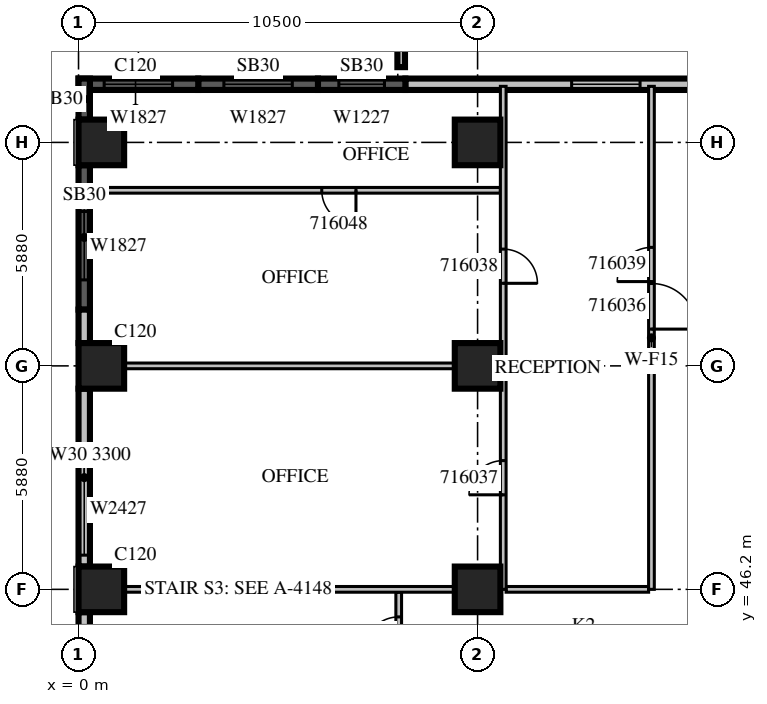
"""IFC4 building model, lengths in metres.
Left out: names, types, materials, properties, quantities, classifications, styles, units other than length and angle.
Written with IfcOpenShell. Run it as: python <this file> out.ifc"""

import sys

from ifc_helpers import new_model, si_unit, direction, frame, frame_2d, origin, origin_2d, place, context, subcontext, project, spatial, rectangle, extrude, source, transform, mapped, element, fill, save


model = new_model("IFC4")
c1 = context("Model", 3, precision=1e-05, world=origin(), true_north=direction((0.0, 1.0)))
c2 = subcontext(c1, "Body", "Model", "MODEL_VIEW")
j1 = project(units=[si_unit("LENGTHUNIT", "METRE"), si_unit("PLANEANGLEUNIT", "RADIAN")], contexts=[c1])
p1 = place(None, origin())
s1 = spatial("IfcSite", under=j1, at=p1, CompositionType="ELEMENT")
p2 = place(p1, origin())
s2 = spatial("IfcBuilding", under=s1, at=p2, CompositionType="ELEMENT")
p3 = place(p2, frame((0.0, 0.0, 78.3)))
s3 = spatial("IfcBuildingStorey", under=s2, at=p3, CompositionType="ELEMENT", Elevation=78.3)
m1 = source(origin(), c2, "Body", "SweptSolid", [
    extrude(rectangle(XDim=1.2, YDim=1.2, at=origin_2d()), origin(), (0.0, 0.0, 1.0), 4.2),
])
for number, where, z_axis, x_axis in (
    (1, (0.6, 46.2, 0.0), (0.0, 0.0, 1.0), (1.0, 0.0, 0.0)),
    (2, (10.5, 46.2, 0.0), (0.0, 0.0, 1.0), (1.0, 0.0, 0.0)),
    (3, (0.6, 52.08, 0.0), (0.0, 0.0, 1.0), (1.0, 0.0, 0.0)),
    (4, (10.5, 52.08, 0.0), (0.0, 0.0, 1.0), (1.0, 0.0, 0.0)),
    (5, (0.6, 57.96, 0.0), (0.0, 0.0, 1.0), (1.0, 0.0, 0.0)),
    (6, (10.5, 57.96, 0.0), (0.0, 0.0, 1.0), (1.0, 0.0, 0.0)),
):
    element("IfcColumn", number, at=place(p3, frame(where, z_axis=z_axis, x_axis=x_axis)), inside=s3, PredefinedType="COLUMN", context=c2, shape_type="MappedRepresentation", body=[
        mapped(m1, transform((0.0, 0.0, 0.0), scale=1.0)),
    ])
p4 = place(p3, frame((16.8, 59.49, 0.0), z_axis=(0.0, 0.0, 1.0), x_axis=(-1.0, 0.0, 0.0)))
e7 = element("IfcWall", 7, at=p4, inside=s3, PredefinedType="STANDARD", context=c2, shape_type="SweptSolid", body=[
    extrude(rectangle(XDim=8.2, YDim=0.3, at=frame_2d((4.1, 0.0))), origin(), (0.0, 0.0, 1.0), 3.8),
])
m2 = source(origin(), c2, "Body", "SweptSolid", [
    extrude(rectangle(XDim=1.8, YDim=2.4, at=frame_2d((0.9, 1.2))), frame((0.0, 0.16, 0.0), z_axis=(0.0, -1.0, 0.0), x_axis=(1.0, 0.0, 0.0)), (0.0, 0.0, 1.0), 0.32),
])
p5 = place(p4, frame((2.025, 0.0, 0.0)))
e8 = element("IfcOpeningElement", 8, at=p5, cuts=e7, PredefinedType="OPENING", context=c2, shape_type="MappedRepresentation", body=[
    mapped(m2, transform((0.0, 0.0, 0.0), scale=1.0)),
])
p6 = place(p3, frame((8.6, 59.49, 0.0), z_axis=(0.0, 0.0, 1.0), x_axis=(-1.0, 0.0, 0.0)))
e9 = element("IfcWall", 9, at=p6, inside=s3, PredefinedType="SOLIDWALL", context=c2, shape_type="SweptSolid", body=[
    extrude(rectangle(XDim=2.3, YDim=0.3, at=frame_2d((1.15, 0.0))), origin(), (0.0, 0.0, 1.0), 3.8),
])
m3 = source(origin(), c2, "Body", "SweptSolid", [
    extrude(rectangle(XDim=1.2, YDim=2.7, at=frame_2d((0.6, 1.35))), frame((0.0, 0.16, 0.0), z_axis=(0.0, -1.0, 0.0), x_axis=(1.0, 0.0, 0.0)), (0.0, 0.0, 1.0), 0.32),
])
p7 = place(p6, frame((0.55, 0.0, 0.6)))
e10 = element("IfcOpeningElement", 10, at=p7, cuts=e9, PredefinedType="OPENING", context=c2, shape_type="MappedRepresentation", body=[
    mapped(m3, transform((0.0, 0.0, 0.0), scale=1.0)),
])
p8 = place(p3, frame((6.3, 59.49, 0.0), z_axis=(0.0, 0.0, 1.0), x_axis=(-1.0, 0.0, 0.0)))
e11 = element("IfcWall", 11, at=p8, inside=s3, PredefinedType="SOLIDWALL", context=c2, shape_type="SweptSolid", body=[
    extrude(rectangle(XDim=3.15, YDim=0.3, at=frame_2d((1.575, 0.0))), origin(), (0.0, 0.0, 1.0), 3.8),
])
m4 = source(origin(), c2, "Body", "SweptSolid", [
    extrude(rectangle(XDim=1.8, YDim=2.7, at=frame_2d((0.9, 1.35))), frame((0.0, 0.16, 0.0), z_axis=(0.0, -1.0, 0.0), x_axis=(1.0, 0.0, 0.0)), (0.0, 0.0, 1.0), 0.32),
])
p9 = place(p8, frame((0.675, 0.0, 0.6)))
e12 = element("IfcOpeningElement", 12, at=p9, cuts=e11, PredefinedType="OPENING", context=c2, shape_type="MappedRepresentation", body=[
    mapped(m4, transform((0.0, 0.0, 0.0), scale=1.0)),
])
m5 = source(origin(), c2, "Body", "SweptSolid", [
    extrude(rectangle(XDim=3.15, YDim=0.3, at=frame_2d((1.575, 0.0))), origin(), (0.0, 0.0, 1.0), 3.8),
])
p10 = place(p3, frame((3.15, 59.49, 0.0), z_axis=(0.0, 0.0, 1.0), x_axis=(-1.0, 0.0, 0.0)))
e13 = element("IfcWall", 13, at=p10, inside=s3, PredefinedType="SOLIDWALL", context=c2, shape_type="MappedRepresentation", body=[
    mapped(m5, transform((0.0, 0.0, 0.0), scale=1.0)),
])
p11 = place(p10, frame((0.675, 0.0, 0.6)))
e14 = element("IfcOpeningElement", 14, at=p11, cuts=e13, PredefinedType="OPENING", context=c2, shape_type="MappedRepresentation", body=[
    mapped(m4, transform((0.0, 0.0, 0.0), scale=1.0)),
])
p12 = place(p3, frame((0.15, 59.64, 0.0), z_axis=(0.0, 0.0, 1.0), x_axis=(0.0, -1.0, 0.0)))
e15 = element("IfcWall", 15, at=p12, inside=s3, PredefinedType="SOLIDWALL", context=c2, shape_type="SweptSolid", body=[
    extrude(rectangle(XDim=1.08, YDim=0.3, at=frame_2d((0.54, 0.0))), origin(), (0.0, 0.0, 1.0), 3.8),
])
m6 = source(origin(), c2, "Body", "SweptSolid", [
    extrude(rectangle(XDim=3.8, YDim=0.3, at=frame_2d((1.9, 0.0))), origin(), (0.0, 0.0, 1.0), 3.8),
])
p13 = place(p3, frame((0.15, 57.36, 0.0), z_axis=(0.0, 0.0, 1.0), x_axis=(0.0, -1.0, 0.0)))
e16 = element("IfcWall", 16, at=p13, inside=s3, PredefinedType="SOLIDWALL", context=c2, shape_type="MappedRepresentation", body=[
    mapped(m6, transform((0.0, 0.0, 0.0), scale=1.0)),
])
p14 = place(p13, frame((1.218, 0.0, 0.6)))
e17 = element("IfcOpeningElement", 17, at=p14, cuts=e16, PredefinedType="OPENING", context=c2, shape_type="MappedRepresentation", body=[
    mapped(m4, transform((0.0, 0.0, 0.0), scale=1.0)),
])
m7 = source(origin(), c2, "Body", "SweptSolid", [
    extrude(rectangle(XDim=0.88, YDim=0.3, at=frame_2d((0.44, 0.0))), origin(), (0.0, 0.0, 1.0), 3.8),
])
p15 = place(p3, frame((0.15, 53.56, 0.0), z_axis=(0.0, 0.0, 1.0), x_axis=(0.0, -1.0, 0.0)))
e18 = element("IfcWall", 18, at=p15, inside=s3, PredefinedType="STANDARD", context=c2, shape_type="MappedRepresentation", body=[
    mapped(m7, transform((0.0, 0.0, 0.0), scale=1.0)),
])
m8 = source(origin(), c2, "Body", "SweptSolid", [
    extrude(rectangle(XDim=4.68, YDim=0.3, at=frame_2d((2.34, 0.0))), origin(), (0.0, 0.0, 1.0), 3.3),
])
p16 = place(p3, frame((0.15, 51.48, 0.0), z_axis=(0.0, 0.0, 1.0), x_axis=(0.0, -1.0, 0.0)))
e19 = element("IfcWall", 19, at=p16, inside=s3, PredefinedType="STANDARD", context=c2, shape_type="MappedRepresentation", body=[
    mapped(m8, transform((0.0, 0.0, 0.0), scale=1.0)),
])
m9 = source(origin(), c2, "Body", "SweptSolid", [
    extrude(rectangle(XDim=2.4, YDim=2.7, at=frame_2d((1.2, 1.35))), frame((0.0, 0.16, 0.0), z_axis=(0.0, -1.0, 0.0), x_axis=(1.0, 0.0, 0.0)), (0.0, 0.0, 1.0), 0.32),
])
p17 = place(p16, frame((1.98, 0.0, 0.6)))
e20 = element("IfcOpeningElement", 20, at=p17, cuts=e19, PredefinedType="OPENING", context=c2, shape_type="MappedRepresentation", body=[
    mapped(m9, transform((0.0, 0.0, 0.0), scale=1.0)),
])
m10 = source(origin(), c2, "Body", "SweptSolid", [
    extrude(rectangle(XDim=1.6, YDim=0.3, at=frame_2d((0.8, 0.0))), origin(), (0.0, 0.0, 1.0), 3.8),
])
p18 = place(p3, frame((0.15, 45.6, 0.0), z_axis=(0.0, 0.0, 1.0), x_axis=(0.0, -1.0, 0.0)))
e21 = element("IfcWall", 21, at=p18, inside=s3, PredefinedType="STANDARD", context=c2, shape_type="MappedRepresentation", body=[
    mapped(m10, transform((0.0, 0.0, 0.0), scale=1.0)),
])
m11 = source(origin(), c2, "Body", "SweptSolid", [
    extrude(rectangle(XDim=0.9, YDim=2.7, at=frame_2d((0.45, 1.35))), frame((0.0, 0.16, 0.0), z_axis=(0.0, -1.0, 0.0), x_axis=(1.0, 0.0, 0.0)), (0.0, 0.0, 1.0), 0.32),
])
p19 = place(p18, frame((0.35, 0.0, 0.6)))
e22 = element("IfcOpeningElement", 22, at=p19, cuts=e21, PredefinedType="OPENING", context=c2, shape_type="MappedRepresentation", body=[
    mapped(m11, transform((0.0, 0.0, 0.0), scale=1.0)),
])
p20 = place(p3, frame((8.49, 59.94, 0.0), z_axis=(0.0, 0.0, 1.0), x_axis=(0.0, 1.0, 0.0)))
e23 = element("IfcWall", 23, at=p20, inside=s3, PredefinedType="PARAPET", context=c2, shape_type="SweptSolid", body=[
    extrude(rectangle(XDim=5.49, YDim=0.2, at=frame_2d((2.745, 0.0))), origin(), (0.0, 0.0, 1.0), 1.1),
])
m12 = source(origin(), c2, "Body", "SweptSolid", [
    extrude(rectangle(XDim=2.2, YDim=0.15, at=frame_2d((1.1, 0.0))), origin(), (0.0, 0.0, 1.0), 3.8),
])
p21 = place(p3, frame((8.425, 43.925, 0.0), z_axis=(0.0, 0.0, 1.0), x_axis=(0.0, 1.0, 0.0)))
e24 = element("IfcWall", 24, at=p21, inside=s3, PredefinedType="PARTITIONING", context=c2, shape_type="MappedRepresentation", body=[
    mapped(m12, transform((0.0, 0.0, 0.0), scale=1.0)),
])
m13 = source(origin(), c2, "Body", "SweptSolid", [
    extrude(rectangle(XDim=0.9, YDim=2.1, at=frame_2d((0.45, 1.05))), frame((0.0, 0.085, 0.0), z_axis=(0.0, -1.0, 0.0), x_axis=(1.0, 0.0, 0.0)), (0.0, 0.0, 1.0), 0.17),
])
p22 = place(p21, frame((0.65, 0.0, 0.0)))
e25 = element("IfcOpeningElement", 25, at=p22, cuts=e24, PredefinedType="OPENING", context=c2, shape_type="MappedRepresentation", body=[
    mapped(m13, transform((0.0, 0.0, 0.0), scale=1.0)),
])
m14 = source(origin(), c2, "Body", "SweptSolid", [
    extrude(rectangle(XDim=8.702, YDim=0.15, at=frame_2d((4.351, 0.0))), origin(), (0.0, 0.0, 1.0), 3.8),
])
p23 = place(p3, frame((9.901, 52.08, 0.0), z_axis=(0.0, 0.0, 1.0), x_axis=(-1.0, 0.0, 0.0)))
e26 = element("IfcWall", 26, at=p23, inside=s3, PredefinedType="PARTITIONING", context=c2, shape_type="MappedRepresentation", body=[
    mapped(m14, transform((0.0, 0.0, 0.0), scale=1.0)),
])
m15 = source(origin(), c2, "Body", "SweptSolid", [
    extrude(rectangle(XDim=10.8, YDim=0.15, at=frame_2d((5.4, 0.0))), origin(), (0.0, 0.0, 1.0), 3.8),
])
p24 = place(p3, frame((11.1, 56.7, 0.0), z_axis=(0.0, 0.0, 1.0), x_axis=(-1.0, 0.0, 0.0)))
e27 = element("IfcWall", 27, at=p24, inside=s3, PredefinedType="PARTITIONING", context=c2, shape_type="MappedRepresentation", body=[
    mapped(m15, transform((0.0, 0.0, 0.0), scale=1.0)),
])
p25 = place(p24, frame((3.8, 0.0, 0.0)))
e28 = element("IfcOpeningElement", 28, at=p25, cuts=e27, PredefinedType="OPENING", context=c2, shape_type="MappedRepresentation", body=[
    mapped(m13, transform((0.0, 0.0, 0.0), scale=1.0)),
])
p26 = place(p3, frame((9.901, 46.2, 0.0), z_axis=(0.0, 0.0, 1.0), x_axis=(-1.0, 0.0, 0.0)))
e29 = element("IfcWall", 29, at=p26, inside=s3, PredefinedType="PARTITIONING", context=c2, shape_type="MappedRepresentation", body=[
    mapped(m14, transform((0.0, 0.0, 0.0), scale=1.0)),
])
m16 = source(origin(), c2, "Body", "SweptSolid", [
    extrude(rectangle(XDim=3.75, YDim=0.15, at=frame_2d((1.875, 0.0))), origin(), (0.0, 0.0, 1.0), 3.8),
])
p27 = place(p3, frame((15.0, 46.2, 0.0), z_axis=(0.0, 0.0, 1.0), x_axis=(-1.0, 0.0, 0.0)))
e30 = element("IfcWall", 30, at=p27, inside=s3, PredefinedType="PARTITIONING", context=c2, shape_type="MappedRepresentation", body=[
    mapped(m16, transform((0.0, 0.0, 0.0), scale=1.0)),
])
p28 = place(p3, frame((11.175, 46.2, 0.0), z_axis=(0.0, 0.0, 1.0), x_axis=(0.0, 1.0, 0.0)))
e31 = element("IfcWall", 31, at=p28, inside=s3, PredefinedType="PARTITIONING", context=c2, shape_type="SweptSolid", body=[
    extrude(rectangle(XDim=13.235, YDim=0.15, at=frame_2d((6.617, 0.0))), origin(), (0.0, 0.0, 1.0), 3.8),
])
p29 = place(p28, frame((2.487, 0.0, 0.0)))
e32 = element("IfcOpeningElement", 32, at=p29, cuts=e31, PredefinedType="OPENING", context=c2, shape_type="MappedRepresentation", body=[
    mapped(m13, transform((0.0, 0.0, 0.0), scale=1.0)),
])
p30 = place(p28, frame((8.053, 0.0, 0.0)))
e33 = element("IfcOpeningElement", 33, at=p30, cuts=e31, PredefinedType="OPENING", context=c2, shape_type="MappedRepresentation", body=[
    mapped(m13, transform((0.0, 0.0, 0.0), scale=1.0)),
])
m17 = source(origin(), c2, "Body", "SweptSolid", [
    extrude(rectangle(XDim=13.235, YDim=0.15, at=frame_2d((6.617, 0.0))), origin(), (0.0, 0.0, 1.0), 3.8),
])
p31 = place(p3, frame((15.075, 46.2, 0.0), z_axis=(0.0, 0.0, 1.0), x_axis=(0.0, 1.0, 0.0)))
e34 = element("IfcWall", 34, at=p31, inside=s3, PredefinedType="PARTITIONING", context=c2, shape_type="MappedRepresentation", body=[
    mapped(m17, transform((0.0, 0.0, 0.0), scale=1.0)),
])
m18 = source(origin(), c2, "Body", "SweptSolid", [
    extrude(rectangle(XDim=1.2, YDim=2.1, at=frame_2d((0.6, 1.05))), frame((0.0, 0.085, 0.0), z_axis=(0.0, -1.0, 0.0), x_axis=(1.0, 0.0, 0.0)), (0.0, 0.0, 1.0), 0.17),
])
p32 = place(p31, frame((6.848, 0.0, 0.0)))
e35 = element("IfcOpeningElement", 35, at=p32, cuts=e34, PredefinedType="OPENING", context=c2, shape_type="MappedRepresentation", body=[
    mapped(m18, transform((0.0, 0.0, 0.0), scale=1.0)),
])
p33 = place(p31, frame((8.098, 0.0, 0.0)))
e36 = element("IfcOpeningElement", 36, at=p33, cuts=e34, PredefinedType="OPENING", context=c2, shape_type="MappedRepresentation", body=[
    mapped(m13, transform((0.0, 0.0, 0.0), scale=1.0)),
])
m19 = source(origin(), c2, "Body", "SweptSolid", [
    extrude(rectangle(XDim=1.8, YDim=2.4, at=frame_2d((0.9, 1.2))), frame((0.0, 0.025, 0.0), z_axis=(0.0, -1.0, 0.0), x_axis=(1.0, 0.0, 0.0)), (0.0, 0.0, 1.0), 0.05),
])
p34 = place(p5, origin())
e37 = element("IfcDoor", 37, at=p34, inside=s3, OperationType="SLIDING_TO_LEFT", PredefinedType="DOOR", context=c2, shape_type="MappedRepresentation", body=[
    mapped(m19, transform((0.0, 0.0, 0.0), scale=1.0)),
])
fill(e8, e37)
m20 = source(origin(), c2, "Body", "SweptSolid", [
    extrude(rectangle(XDim=1.2, YDim=2.7, at=frame_2d((0.6, 1.35))), frame((0.0, 0.03, 0.0), z_axis=(0.0, -1.0, 0.0), x_axis=(1.0, 0.0, 0.0)), (0.0, 0.0, 1.0), 0.06),
])
p35 = place(p7, origin())
e38 = element("IfcWindow", 38, at=p35, inside=s3, PartitioningType="SINGLE_PANEL", PredefinedType="WINDOW", context=c2, shape_type="MappedRepresentation", body=[
    mapped(m20, transform((0.0, 0.0, 0.0), scale=1.0)),
])
fill(e10, e38)
m21 = source(origin(), c2, "Body", "SweptSolid", [
    extrude(rectangle(XDim=1.8, YDim=2.7, at=frame_2d((0.9, 1.35))), frame((0.0, 0.03, 0.0), z_axis=(0.0, -1.0, 0.0), x_axis=(1.0, 0.0, 0.0)), (0.0, 0.0, 1.0), 0.06),
])
p36 = place(p9, origin())
e39 = element("IfcWindow", 39, at=p36, inside=s3, PartitioningType="SINGLE_PANEL", PredefinedType="WINDOW", context=c2, shape_type="MappedRepresentation", body=[
    mapped(m21, transform((0.0, 0.0, 0.0), scale=1.0)),
])
fill(e12, e39)
p37 = place(p11, origin())
e40 = element("IfcWindow", 40, at=p37, inside=s3, PartitioningType="SINGLE_PANEL", PredefinedType="WINDOW", context=c2, shape_type="MappedRepresentation", body=[
    mapped(m21, transform((0.0, 0.0, 0.0), scale=1.0)),
])
fill(e14, e40)
m22 = source(origin(), c2, "Body", "SweptSolid", [
    extrude(rectangle(XDim=2.4, YDim=2.7, at=frame_2d((1.2, 1.35))), frame((0.0, 0.03, 0.0), z_axis=(0.0, -1.0, 0.0), x_axis=(1.0, 0.0, 0.0)), (0.0, 0.0, 1.0), 0.06),
])
p38 = place(p17, origin())
e41 = element("IfcWindow", 41, at=p38, inside=s3, PartitioningType="SINGLE_PANEL", PredefinedType="WINDOW", context=c2, shape_type="MappedRepresentation", body=[
    mapped(m22, transform((0.0, 0.0, 0.0), scale=1.0)),
])
fill(e20, e41)
p39 = place(p14, origin())
e42 = element("IfcWindow", 42, at=p39, inside=s3, PartitioningType="SINGLE_PANEL", PredefinedType="WINDOW", context=c2, shape_type="MappedRepresentation", body=[
    mapped(m21, transform((0.0, 0.0, 0.0), scale=1.0)),
])
fill(e17, e42)
m23 = source(origin(), c2, "Body", "SweptSolid", [
    extrude(rectangle(XDim=0.9, YDim=2.1, at=frame_2d((0.45, 1.05))), frame((0.0, 0.025, 0.0), z_axis=(0.0, -1.0, 0.0), x_axis=(1.0, 0.0, 0.0)), (0.0, 0.0, 1.0), 0.05),
])
p40 = place(p22, origin())
e43 = element("IfcDoor", 43, at=p40, inside=s3, OperationType="SINGLE_SWING_LEFT", PredefinedType="DOOR", context=c2, shape_type="MappedRepresentation", body=[
    mapped(m23, transform((0.0, 0.0, 0.0), scale=1.0)),
])
fill(e25, e43)
m24 = source(origin(), c2, "Body", "SweptSolid", [
    extrude(rectangle(XDim=1.2, YDim=2.1, at=frame_2d((0.6, 1.05))), frame((0.0, 0.025, 0.0), z_axis=(0.0, -1.0, 0.0), x_axis=(1.0, 0.0, 0.0)), (0.0, 0.0, 1.0), 0.05),
])
p41 = place(p32, origin())
e44 = element("IfcDoor", 44, at=p41, inside=s3, OperationType="SINGLE_SWING_RIGHT", PredefinedType="DOOR", context=c2, shape_type="MappedRepresentation", body=[
    mapped(m24, transform((0.0, 0.0, 0.0), scale=1.0)),
])
fill(e35, e44)
p42 = place(p29, origin())
e45 = element("IfcDoor", 45, at=p42, inside=s3, OperationType="SINGLE_SWING_LEFT", PredefinedType="DOOR", context=c2, shape_type="MappedRepresentation", body=[
    mapped(m23, transform((0.0, 0.0, 0.0), scale=1.0)),
])
fill(e32, e45)
p43 = place(p30, origin())
e46 = element("IfcDoor", 46, at=p43, inside=s3, OperationType="SINGLE_SWING_RIGHT", PredefinedType="DOOR", context=c2, shape_type="MappedRepresentation", body=[
    mapped(m23, transform((0.0, 0.0, 0.0), scale=1.0)),
])
fill(e33, e46)
p44 = place(p33, origin())
e47 = element("IfcDoor", 47, at=p44, inside=s3, OperationType="SINGLE_SWING_LEFT", PredefinedType="DOOR", context=c2, shape_type="MappedRepresentation", body=[
    mapped(m23, transform((0.0, 0.0, 0.0), scale=1.0)),
])
fill(e36, e47)
p45 = place(p25, origin())
e48 = element("IfcDoor", 48, at=p45, inside=s3, OperationType="SINGLE_SWING_LEFT", PredefinedType="DOOR", context=c2, shape_type="MappedRepresentation", body=[
    mapped(m23, transform((0.0, 0.0, 0.0), scale=1.0)),
])
fill(e28, e48)
save(model, sys.argv[1])
